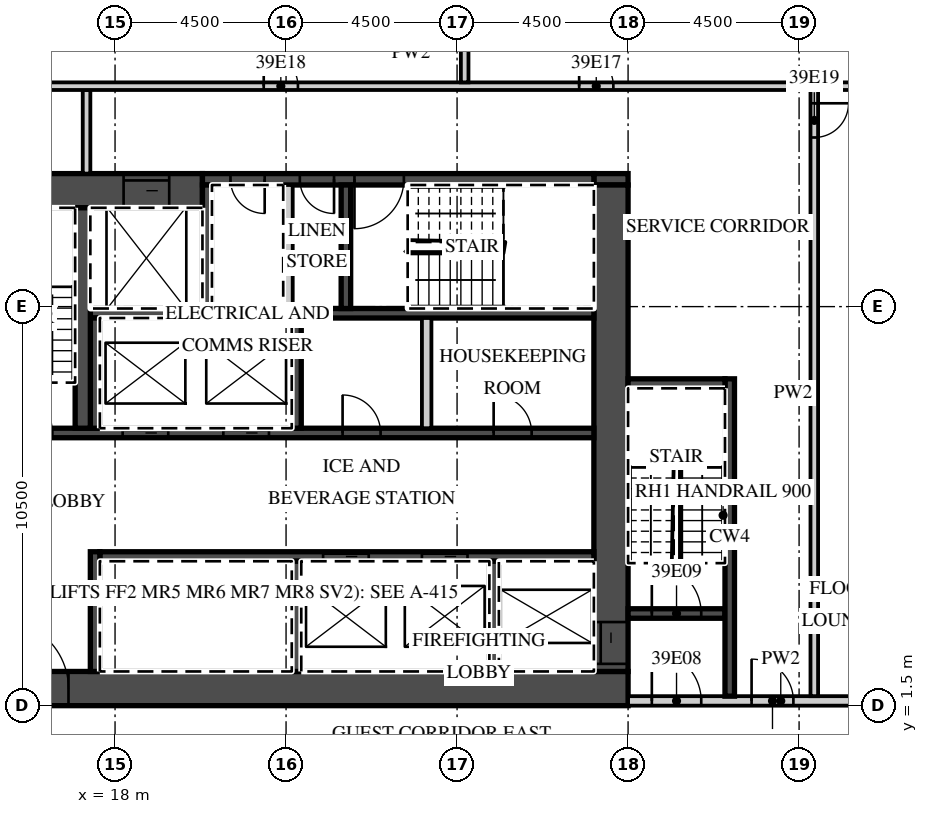
"""IFC4 building model, lengths in metres.
Left out: names, types, materials, properties, quantities, classifications, styles, units other than length and angle.
Written with IfcOpenShell. Run it as: python <this file> out.ifc"""

import sys

from ifc_helpers import new_model, si_unit, direction, frame, frame_2d, origin, place, context, subcontext, project, spatial, rectangle, extrude, element, fill, save


model = new_model("IFC4")
c1 = context("Model", 3, precision=1e-05, world=origin(), true_north=direction((0.0, 1.0)))
c2 = subcontext(c1, "Body", "Model", "MODEL_VIEW")
j1 = project(units=[si_unit("LENGTHUNIT", "METRE"), si_unit("PLANEANGLEUNIT", "RADIAN")], contexts=[c1])
p1 = place(None, origin())
s1 = spatial("IfcSite", under=j1, at=p1, CompositionType="ELEMENT")
p2 = place(p1, origin())
s2 = spatial("IfcBuilding", under=s1, at=p2, CompositionType="ELEMENT")
p3 = place(p2, frame((0.0, 0.0, 170.2)))
s3 = spatial("IfcBuildingStorey", under=s2, at=p3, CompositionType="ELEMENT", Elevation=170.2)
p4 = place(p3, frame((13.5, 1.95, 0.0), z_axis=(0.0, 0.0, 1.0), x_axis=(1.0, 0.0, 0.0)))
e1 = element("IfcWall", 1, at=p4, inside=s3, PredefinedType="SHEAR", context=c2, shape_type="SweptSolid", body=[
    extrude(rectangle(XDim=18.0, YDim=0.9, at=frame_2d((9.0, 0.0))), origin(), (0.0, 0.0, 1.0), 3.02),
])
p5 = place(p4, frame((1.475, 0.0, 0.0)))
e2 = element("IfcOpeningElement", 2, at=p5, cuts=e1, PredefinedType="OPENING", context=c2, shape_type="SweptSolid", body=[
    extrude(rectangle(XDim=1.8, YDim=2.1, at=frame_2d((0.9, 1.05))), frame((0.0, 0.46, 0.0), z_axis=(0.0, -1.0, 0.0), x_axis=(1.0, 0.0, 0.0)), (0.0, 0.0, 1.0), 0.92),
])
p6 = place(p3, frame((13.5, 15.05, 0.0), z_axis=(0.0, 0.0, 1.0), x_axis=(1.0, 0.0, 0.0)))
e3 = element("IfcWall", 3, at=p6, inside=s3, PredefinedType="SHEAR", context=c2, shape_type="SweptSolid", body=[
    extrude(rectangle(XDim=6.8, YDim=0.9, at=frame_2d((3.4, 0.0))), origin(), (0.0, 0.0, 1.0), 3.02),
])
p7 = place(p6, frame((4.725, 0.0, 0.0)))
e4 = element("IfcOpeningElement", 4, at=p7, cuts=e3, PredefinedType="OPENING", context=c2, shape_type="SweptSolid", body=[
    extrude(rectangle(XDim=1.2, YDim=2.1, at=frame_2d((0.6, 1.05))), frame((0.0, 0.46, 0.0), z_axis=(0.0, -1.0, 0.0), x_axis=(1.0, 0.0, 0.0)), (0.0, 0.0, 1.0), 0.92),
])
p8 = place(p3, frame((30.6, 15.35, 0.0), z_axis=(0.0, 0.0, 1.0), x_axis=(1.0, 0.0, 0.0)))
e5 = element("IfcWall", 5, at=p8, inside=s3, PredefinedType="SHEAR", context=c2, shape_type="SweptSolid", body=[
    extrude(rectangle(XDim=0.9, YDim=0.3, at=frame_2d((0.45, 0.0))), origin(), (0.0, 0.0, 1.0), 3.02),
])
p9 = place(p3, frame((20.3, 15.35, 0.0), z_axis=(0.0, 0.0, 1.0), x_axis=(1.0, 0.0, 0.0)))
e6 = element("IfcWall", 6, at=p9, inside=s3, PredefinedType="SHEAR", context=c2, shape_type="SweptSolid", body=[
    extrude(rectangle(XDim=10.3, YDim=0.3, at=frame_2d((5.15, 0.0))), origin(), (0.0, 0.0, 1.0), 3.02),
])
p10 = place(p9, frame((4.0, 0.0, 0.0)))
e7 = element("IfcOpeningElement", 7, at=p10, cuts=e6, PredefinedType="OPENING", context=c2, shape_type="SweptSolid", body=[
    extrude(rectangle(XDim=1.3, YDim=2.1, at=frame_2d((0.65, 1.05))), frame((0.0, 0.16, 0.0), z_axis=(0.0, -1.0, 0.0), x_axis=(1.0, 0.0, 0.0)), (0.0, 0.0, 1.0), 0.32),
])
p11 = place(p9, frame((2.562, 0.0, 0.0)))
e8 = element("IfcOpeningElement", 8, at=p11, cuts=e6, PredefinedType="OPENING", context=c2, shape_type="SweptSolid", body=[
    extrude(rectangle(XDim=0.9, YDim=2.1, at=frame_2d((0.45, 1.05))), frame((0.0, 0.16, 0.0), z_axis=(0.0, -1.0, 0.0), x_axis=(1.0, 0.0, 0.0)), (0.0, 0.0, 1.0), 0.32),
])
p12 = place(p9, frame((0.738, 0.0, 0.0)))
e9 = element("IfcOpeningElement", 9, at=p12, cuts=e6, PredefinedType="OPENING", context=c2, shape_type="SweptSolid", body=[
    extrude(rectangle(XDim=0.9, YDim=2.1, at=frame_2d((0.45, 1.05))), frame((0.0, 0.16, 0.0), z_axis=(0.0, -1.0, 0.0), x_axis=(1.0, 0.0, 0.0)), (0.0, 0.0, 1.0), 0.32),
])
p13 = place(p3, frame((31.05, 2.4, 0.0), z_axis=(0.0, 0.0, 1.0), x_axis=(0.0, 1.0, 0.0)))
e10 = element("IfcWall", 10, at=p13, inside=s3, PredefinedType="SHEAR", context=c2, shape_type="SweptSolid", body=[
    extrude(rectangle(XDim=12.8, YDim=0.9, at=frame_2d((6.4, 0.0))), origin(), (0.0, 0.0, 1.0), 3.02),
])
p14 = place(p13, frame((0.2, 0.0, 0.0)))
e11 = element("IfcOpeningElement", 11, at=p14, cuts=e10, PredefinedType="OPENING", context=c2, shape_type="SweptSolid", body=[
    extrude(rectangle(XDim=1.1, YDim=2.1, at=frame_2d((0.55, 1.05))), frame((0.0, 0.46, 0.0), z_axis=(0.0, -1.0, 0.0), x_axis=(1.0, 0.0, 0.0)), (0.0, 0.0, 1.0), 0.92),
])
p15 = place(p3, frame((17.6, 5.425, 0.0), z_axis=(0.0, 0.0, 1.0), x_axis=(1.0, 0.0, 0.0)))
e12 = element("IfcWall", 12, at=p15, inside=s3, PredefinedType="SHEAR", context=c2, shape_type="SweptSolid", body=[
    extrude(rectangle(XDim=13.0, YDim=0.25, at=frame_2d((6.5, 0.0))), origin(), (0.0, 0.0, 1.0), 3.02),
])
p16 = place(p15, frame((8.475, 0.0, 0.0)))
e13 = element("IfcOpeningElement", 13, at=p16, cuts=e12, PredefinedType="OPENING", context=c2, shape_type="SweptSolid", body=[
    extrude(rectangle(XDim=1.2, YDim=2.1, at=frame_2d((0.6, 1.05))), frame((0.0, 0.135, 0.0), z_axis=(0.0, -1.0, 0.0), x_axis=(1.0, 0.0, 0.0)), (0.0, 0.0, 1.0), 0.27),
])
p17 = place(p15, frame((5.875, 0.0, 0.0)))
e14 = element("IfcOpeningElement", 14, at=p17, cuts=e12, PredefinedType="OPENING", context=c2, shape_type="SweptSolid", body=[
    extrude(rectangle(XDim=1.2, YDim=2.1, at=frame_2d((0.6, 1.05))), frame((0.0, 0.135, 0.0), z_axis=(0.0, -1.0, 0.0), x_axis=(1.0, 0.0, 0.0)), (0.0, 0.0, 1.0), 0.27),
])
p18 = place(p3, frame((17.475, 2.4, 0.0), z_axis=(0.0, 0.0, 1.0), x_axis=(0.0, 1.0, 0.0)))
e15 = element("IfcWall", 15, at=p18, inside=s3, PredefinedType="SHEAR", context=c2, shape_type="SweptSolid", body=[
    extrude(rectangle(XDim=3.15, YDim=0.25, at=frame_2d((1.575, 0.0))), origin(), (0.0, 0.0, 1.0), 3.02),
])
for number, where, z_axis, x_axis in (
    (16, (27.975, 2.4, 0.0), (0.0, 0.0, 1.0), (0.0, 1.0, 0.0)),
    (17, (22.775, 2.4, 0.0), (0.0, 0.0, 1.0), (0.0, 1.0, 0.0)),
):
    element("IfcWall", number, at=place(p3, frame(where, z_axis=z_axis, x_axis=x_axis)), inside=s3, PredefinedType="SHEAR", context=c2, shape_type="SweptSolid", body=[
        extrude(rectangle(XDim=2.9, YDim=0.25, at=frame_2d((1.45, 0.0))), origin(), (0.0, 0.0, 1.0), 3.02),
    ])
p19 = place(p3, frame((14.4, 8.675, 0.0), z_axis=(0.0, 0.0, 1.0), x_axis=(1.0, 0.0, 0.0)))
e18 = element("IfcWall", 18, at=p19, inside=s3, PredefinedType="SHEAR", context=c2, shape_type="SweptSolid", body=[
    extrude(rectangle(XDim=16.2, YDim=0.25, at=frame_2d((8.1, 0.0))), origin(), (0.0, 0.0, 1.0), 3.02),
])
p20 = place(p19, frame((6.45, 0.0, 0.0)))
e19 = element("IfcOpeningElement", 19, at=p20, cuts=e18, PredefinedType="OPENING", context=c2, shape_type="SweptSolid", body=[
    extrude(rectangle(XDim=1.2, YDim=2.1, at=frame_2d((0.6, 1.05))), frame((0.0, 0.135, 0.0), z_axis=(0.0, -1.0, 0.0), x_axis=(1.0, 0.0, 0.0)), (0.0, 0.0, 1.0), 0.27),
])
p21 = place(p19, frame((3.8, 0.0, 0.0)))
e20 = element("IfcOpeningElement", 20, at=p21, cuts=e18, PredefinedType="OPENING", context=c2, shape_type="SweptSolid", body=[
    extrude(rectangle(XDim=1.2, YDim=2.1, at=frame_2d((0.6, 1.05))), frame((0.0, 0.135, 0.0), z_axis=(0.0, -1.0, 0.0), x_axis=(1.0, 0.0, 0.0)), (0.0, 0.0, 1.0), 0.27),
])
p22 = place(p19, frame((0.65, 0.0, 0.0)))
e21 = element("IfcOpeningElement", 21, at=p22, cuts=e18, PredefinedType="OPENING", context=c2, shape_type="SweptSolid", body=[
    extrude(rectangle(XDim=1.3, YDim=2.1, at=frame_2d((0.65, 1.05))), frame((0.0, 0.135, 0.0), z_axis=(0.0, -1.0, 0.0), x_axis=(1.0, 0.0, 0.0)), (0.0, 0.0, 1.0), 0.27),
])
p23 = place(p19, frame((13.562, 0.0, 0.0)))
e22 = element("IfcOpeningElement", 22, at=p23, cuts=e18, PredefinedType="OPENING", context=c2, shape_type="SweptSolid", body=[
    extrude(rectangle(XDim=1.0, YDim=2.1, at=frame_2d((0.5, 1.05))), frame((0.0, 0.135, 0.0), z_axis=(0.0, -1.0, 0.0), x_axis=(1.0, 0.0, 0.0)), (0.0, 0.0, 1.0), 0.27),
])
p24 = place(p19, frame((9.587, 0.0, 0.0)))
e23 = element("IfcOpeningElement", 23, at=p24, cuts=e18, PredefinedType="OPENING", context=c2, shape_type="SweptSolid", body=[
    extrude(rectangle(XDim=1.0, YDim=2.1, at=frame_2d((0.5, 1.05))), frame((0.0, 0.135, 0.0), z_axis=(0.0, -1.0, 0.0), x_axis=(1.0, 0.0, 0.0)), (0.0, 0.0, 1.0), 0.27),
])
p25 = place(p3, frame((17.35, 11.825, 0.0), z_axis=(0.0, 0.0, 1.0), x_axis=(1.0, 0.0, 0.0)))
e24 = element("IfcWall", 24, at=p25, inside=s3, PredefinedType="SHEAR", context=c2, shape_type="SweptSolid", body=[
    extrude(rectangle(XDim=13.25, YDim=0.25, at=frame_2d((6.625, 0.0))), origin(), (0.0, 0.0, 1.0), 3.02),
])
for number, where, z_axis, x_axis in (
    (25, (17.475, 8.8, 0.0), (0.0, 0.0, 1.0), (0.0, 1.0, 0.0)),
    (26, (22.775, 8.8, 0.0), (0.0, 0.0, 1.0), (0.0, 1.0, 0.0)),
):
    element("IfcWall", number, at=place(p3, frame(where, z_axis=z_axis, x_axis=x_axis)), inside=s3, PredefinedType="SHEAR", context=c2, shape_type="SweptSolid", body=[
        extrude(rectangle(XDim=2.9, YDim=0.25, at=frame_2d((1.45, 0.0))), origin(), (0.0, 0.0, 1.0), 3.02),
    ])
p26 = place(p3, frame((26.2, 8.8, 0.0), z_axis=(0.0, 0.0, 1.0), x_axis=(0.0, 1.0, 0.0)))
e27 = element("IfcWall", 27, at=p26, inside=s3, PredefinedType="PARTITIONING", context=c2, shape_type="SweptSolid", body=[
    extrude(rectangle(XDim=2.9, YDim=0.25, at=frame_2d((1.45, 0.0))), origin(), (0.0, 0.0, 1.0), 3.02),
])
p27 = place(p3, frame((17.15, 8.8, 0.0), z_axis=(0.0, 0.0, 1.0), x_axis=(0.0, 1.0, 0.0)))
e28 = element("IfcWall", 28, at=p27, inside=s3, PredefinedType="SHEAR", context=c2, shape_type="SweptSolid", body=[
    extrude(rectangle(XDim=5.8, YDim=0.4, at=frame_2d((2.9, 0.0))), origin(), (0.0, 0.0, 1.0), 3.02),
])
for number, where, z_axis, x_axis in (
    (29, (20.425, 11.95, 0.0), (0.0, 0.0, 1.0), (0.0, 1.0, 0.0)),
    (30, (24.075, 11.95, 0.0), (0.0, 0.0, 1.0), (0.0, 1.0, 0.0)),
):
    element("IfcWall", number, at=place(p3, frame(where, z_axis=z_axis, x_axis=x_axis)), inside=s3, PredefinedType="SHEAR", context=c2, shape_type="SweptSolid", body=[
        extrude(rectangle(XDim=3.25, YDim=0.25, at=frame_2d((1.625, 0.0))), origin(), (0.0, 0.0, 1.0), 3.02),
    ])
p28 = place(p3, frame((22.55, 11.95, 0.0), z_axis=(0.0, 0.0, 1.0), x_axis=(0.0, 1.0, 0.0)))
e31 = element("IfcWall", 31, at=p28, inside=s3, PredefinedType="PARTITIONING", context=c2, shape_type="SweptSolid", body=[
    extrude(rectangle(XDim=3.25, YDim=0.25, at=frame_2d((1.625, 0.0))), origin(), (0.0, 0.0, 1.0), 3.02),
])
p29 = place(p3, frame((31.5, 1.625, 0.0), z_axis=(0.0, 0.0, 1.0), x_axis=(1.0, 0.0, 0.0)))
e32 = element("IfcWall", 32, at=p29, inside=s3, PredefinedType="PARTITIONING", context=c2, shape_type="SweptSolid", body=[
    extrude(rectangle(XDim=8.035, YDim=0.25, at=frame_2d((4.018, 0.0))), origin(), (0.0, 0.0, 1.0), 3.02),
])
p30 = place(p29, frame((0.625, 0.0, 0.0)))
e33 = element("IfcOpeningElement", 33, at=p30, cuts=e32, PredefinedType="OPENING", context=c2, shape_type="SweptSolid", body=[
    extrude(rectangle(XDim=1.3, YDim=2.1, at=frame_2d((0.65, 1.05))), frame((0.0, 0.135, 0.0), z_axis=(0.0, -1.0, 0.0), x_axis=(1.0, 0.0, 0.0)), (0.0, 0.0, 1.0), 0.27),
])
p31 = place(p29, frame((3.25, 0.0, 0.0)))
e34 = element("IfcOpeningElement", 34, at=p31, cuts=e32, PredefinedType="OPENING", context=c2, shape_type="SweptSolid", body=[
    extrude(rectangle(XDim=1.1, YDim=2.1, at=frame_2d((0.55, 1.05))), frame((0.0, 0.135, 0.0), z_axis=(0.0, -1.0, 0.0), x_axis=(1.0, 0.0, 0.0)), (0.0, 0.0, 1.0), 0.27),
])
p32 = place(p3, frame((31.5, 3.925, 0.0), z_axis=(0.0, 0.0, 1.0), x_axis=(1.0, 0.0, 0.0)))
e35 = element("IfcWall", 35, at=p32, inside=s3, PredefinedType="SHEAR", context=c2, shape_type="SweptSolid", body=[
    extrude(rectangle(XDim=2.55, YDim=0.25, at=frame_2d((1.275, 0.0))), origin(), (0.0, 0.0, 1.0), 3.02),
])
p33 = place(p32, frame((0.625, 0.0, 0.0)))
e36 = element("IfcOpeningElement", 36, at=p33, cuts=e35, PredefinedType="OPENING", context=c2, shape_type="SweptSolid", body=[
    extrude(rectangle(XDim=1.3, YDim=2.1, at=frame_2d((0.65, 1.05))), frame((0.0, 0.135, 0.0), z_axis=(0.0, -1.0, 0.0), x_axis=(1.0, 0.0, 0.0)), (0.0, 0.0, 1.0), 0.27),
])
p34 = place(p3, frame((34.175, 1.75, 0.0), z_axis=(0.0, 0.0, 1.0), x_axis=(0.0, 1.0, 0.0)))
e37 = element("IfcWall", 37, at=p34, inside=s3, PredefinedType="SHEAR", context=c2, shape_type="SweptSolid", body=[
    extrude(rectangle(XDim=8.35, YDim=0.25, at=frame_2d((4.175, 0.0))), origin(), (0.0, 0.0, 1.0), 3.02),
])
p35 = place(p3, frame((31.5, 9.975, 0.0), z_axis=(0.0, 0.0, 1.0), x_axis=(1.0, 0.0, 0.0)))
e38 = element("IfcWall", 38, at=p35, inside=s3, PredefinedType="SHEAR", context=c2, shape_type="SweptSolid", body=[
    extrude(rectangle(XDim=2.55, YDim=0.25, at=frame_2d((1.275, 0.0))), origin(), (0.0, 0.0, 1.0), 3.02),
])
p36 = place(p3, frame((17.25, 15.5, 0.0), z_axis=(0.0, 0.0, 1.0), x_axis=(0.0, 1.0, 0.0)))
e39 = element("IfcWall", 39, at=p36, inside=s3, PredefinedType="PARTITIONING", context=c2, shape_type="SweptSolid", body=[
    extrude(rectangle(XDim=2.2, YDim=0.2, at=frame_2d((1.1, 0.0))), origin(), (0.0, 0.0, 1.0), 3.02),
])
p37 = place(p3, frame((36.4, 1.75, 0.0), z_axis=(0.0, 0.0, 1.0), x_axis=(0.0, 1.0, 0.0)))
e40 = element("IfcWall", 40, at=p37, inside=s3, PredefinedType="PARTITIONING", context=c2, shape_type="SweptSolid", body=[
    extrude(rectangle(XDim=15.95, YDim=0.2, at=frame_2d((7.975, 0.0))), origin(), (0.0, 0.0, 1.0), 3.02),
])
p38 = place(p37, frame((14.7, 0.0, 0.0)))
e41 = element("IfcOpeningElement", 41, at=p38, cuts=e40, PredefinedType="OPENING", context=c2, shape_type="SweptSolid", body=[
    extrude(rectangle(XDim=0.9, YDim=2.1, at=frame_2d((0.45, 1.05))), frame((0.0, 0.11, 0.0), z_axis=(0.0, -1.0, 0.0), x_axis=(1.0, 0.0, 0.0)), (0.0, 0.0, 1.0), 0.22),
])
p39 = place(p3, frame((13.6, 17.8, 0.0), z_axis=(0.0, 0.0, 1.0), x_axis=(1.0, 0.0, 0.0)))
e42 = element("IfcWall", 42, at=p39, inside=s3, PredefinedType="PARTITIONING", context=c2, shape_type="SweptSolid", body=[
    extrude(rectangle(XDim=24.378, YDim=0.2, at=frame_2d((12.189, 0.0))), origin(), (0.0, 0.0, 1.0), 3.02),
])
p40 = place(p39, frame((16.613, 0.0, 0.0)))
e43 = element("IfcOpeningElement", 43, at=p40, cuts=e42, PredefinedType="OPENING", context=c2, shape_type="SweptSolid", body=[
    extrude(rectangle(XDim=0.9, YDim=2.1, at=frame_2d((0.45, 1.05))), frame((0.0, 0.11, 0.0), z_axis=(0.0, -1.0, 0.0), x_axis=(1.0, 0.0, 0.0)), (0.0, 0.0, 1.0), 0.22),
])
p41 = place(p39, frame((8.312, 0.0, 0.0)))
e44 = element("IfcOpeningElement", 44, at=p41, cuts=e42, PredefinedType="OPENING", context=c2, shape_type="SweptSolid", body=[
    extrude(rectangle(XDim=0.9, YDim=2.1, at=frame_2d((0.45, 1.05))), frame((0.0, 0.11, 0.0), z_axis=(0.0, -1.0, 0.0), x_axis=(1.0, 0.0, 0.0)), (0.0, 0.0, 1.0), 0.22),
])
p42 = place(p3, frame((27.2, 17.9, 0.0), z_axis=(0.0, 0.0, 1.0), x_axis=(0.0, 1.0, 0.0)))
e45 = element("IfcWall", 45, at=p42, inside=s3, PredefinedType="PARTITIONING", context=c2, shape_type="SweptSolid", body=[
    extrude(rectangle(XDim=5.01, YDim=0.2, at=frame_2d((2.505, 0.0))), origin(), (0.0, 0.0, 1.0), 3.02),
])
p43 = place(p20, origin())
e46 = element("IfcDoor", 46, at=p43, inside=s3, OperationType="SLIDING_TO_LEFT", PredefinedType="DOOR", context=c2, shape_type="SweptSolid", body=[
    extrude(rectangle(XDim=1.2, YDim=2.1, at=frame_2d((0.6, 1.05))), frame((0.0, 0.025, 0.0), z_axis=(0.0, -1.0, 0.0), x_axis=(1.0, 0.0, 0.0)), (0.0, 0.0, 1.0), 0.05),
])
fill(e19, e46)
p44 = place(p21, origin())
e47 = element("IfcDoor", 47, at=p44, inside=s3, OperationType="SLIDING_TO_RIGHT", PredefinedType="DOOR", context=c2, shape_type="SweptSolid", body=[
    extrude(rectangle(XDim=1.2, YDim=2.1, at=frame_2d((0.6, 1.05))), frame((0.0, 0.025, 0.0), z_axis=(0.0, -1.0, 0.0), x_axis=(1.0, 0.0, 0.0)), (0.0, 0.0, 1.0), 0.05),
])
fill(e20, e47)
p45 = place(p16, origin())
e48 = element("IfcDoor", 48, at=p45, inside=s3, OperationType="SLIDING_TO_LEFT", PredefinedType="DOOR", context=c2, shape_type="SweptSolid", body=[
    extrude(rectangle(XDim=1.2, YDim=2.1, at=frame_2d((0.6, 1.05))), frame((0.0, 0.025, 0.0), z_axis=(0.0, -1.0, 0.0), x_axis=(1.0, 0.0, 0.0)), (0.0, 0.0, 1.0), 0.05),
])
fill(e13, e48)
p46 = place(p17, origin())
e49 = element("IfcDoor", 49, at=p46, inside=s3, OperationType="SLIDING_TO_RIGHT", PredefinedType="DOOR", context=c2, shape_type="SweptSolid", body=[
    extrude(rectangle(XDim=1.2, YDim=2.1, at=frame_2d((0.6, 1.05))), frame((0.0, 0.025, 0.0), z_axis=(0.0, -1.0, 0.0), x_axis=(1.0, 0.0, 0.0)), (0.0, 0.0, 1.0), 0.05),
])
fill(e14, e49)
p47 = place(p7, origin())
e50 = element("IfcDoor", 50, at=p47, inside=s3, OperationType="SLIDING_TO_LEFT", PredefinedType="DOOR", context=c2, shape_type="SweptSolid", body=[
    extrude(rectangle(XDim=1.2, YDim=2.1, at=frame_2d((0.6, 1.05))), frame((0.0, 0.025, 0.0), z_axis=(0.0, -1.0, 0.0), x_axis=(1.0, 0.0, 0.0)), (0.0, 0.0, 1.0), 0.05),
])
fill(e4, e50)
p48 = place(p14, origin())
e51 = element("IfcDoor", 51, at=p48, inside=s3, OperationType="SLIDING_TO_LEFT", PredefinedType="DOOR", context=c2, shape_type="SweptSolid", body=[
    extrude(rectangle(XDim=1.1, YDim=2.1, at=frame_2d((0.55, 1.05))), frame((0.0, 0.025, 0.0), z_axis=(0.0, -1.0, 0.0), x_axis=(1.0, 0.0, 0.0)), (0.0, 0.0, 1.0), 0.05),
])
fill(e11, e51)
p49 = place(p5, origin())
e52 = element("IfcDoor", 52, at=p49, inside=s3, OperationType="DOUBLE_DOOR_DOUBLE_SWING", PredefinedType="DOOR", context=c2, shape_type="SweptSolid", body=[
    extrude(rectangle(XDim=1.8, YDim=2.1, at=frame_2d((0.9, 1.05))), frame((0.0, 0.025, 0.0), z_axis=(0.0, -1.0, 0.0), x_axis=(1.0, 0.0, 0.0)), (0.0, 0.0, 1.0), 0.05),
])
fill(e2, e52)
p50 = place(p30, origin())
e53 = element("IfcDoor", 53, at=p50, inside=s3, OperationType="SINGLE_SWING_LEFT", PredefinedType="DOOR", context=c2, shape_type="SweptSolid", body=[
    extrude(rectangle(XDim=1.3, YDim=2.1, at=frame_2d((0.65, 1.05))), frame((0.0, 0.025, 0.0), z_axis=(0.0, -1.0, 0.0), x_axis=(1.0, 0.0, 0.0)), (0.0, 0.0, 1.0), 0.05),
])
fill(e33, e53)
p51 = place(p33, origin())
e54 = element("IfcDoor", 54, at=p51, inside=s3, OperationType="SINGLE_SWING_LEFT", PredefinedType="DOOR", context=c2, shape_type="SweptSolid", body=[
    extrude(rectangle(XDim=1.3, YDim=2.1, at=frame_2d((0.65, 1.05))), frame((0.0, 0.025, 0.0), z_axis=(0.0, -1.0, 0.0), x_axis=(1.0, 0.0, 0.0)), (0.0, 0.0, 1.0), 0.05),
])
fill(e36, e54)
p52 = place(p31, origin())
e55 = element("IfcDoor", 55, at=p52, inside=s3, OperationType="SINGLE_SWING_LEFT", PredefinedType="DOOR", context=c2, shape_type="SweptSolid", body=[
    extrude(rectangle(XDim=1.1, YDim=2.1, at=frame_2d((0.55, 1.05))), frame((0.0, 0.025, 0.0), z_axis=(0.0, -1.0, 0.0), x_axis=(1.0, 0.0, 0.0)), (0.0, 0.0, 1.0), 0.05),
])
fill(e34, e55)
p53 = place(p10, origin())
e56 = element("IfcDoor", 56, at=p53, inside=s3, OperationType="SINGLE_SWING_LEFT", PredefinedType="DOOR", context=c2, shape_type="SweptSolid", body=[
    extrude(rectangle(XDim=1.3, YDim=2.1, at=frame_2d((0.65, 1.05))), frame((0.0, 0.025, 0.0), z_axis=(0.0, -1.0, 0.0), x_axis=(1.0, 0.0, 0.0)), (0.0, 0.0, 1.0), 0.05),
])
fill(e7, e56)
p54 = place(p11, origin())
e57 = element("IfcDoor", 57, at=p54, inside=s3, OperationType="SINGLE_SWING_RIGHT", PredefinedType="DOOR", context=c2, shape_type="SweptSolid", body=[
    extrude(rectangle(XDim=0.9, YDim=2.1, at=frame_2d((0.45, 1.05))), frame((0.0, 0.025, 0.0), z_axis=(0.0, -1.0, 0.0), x_axis=(1.0, 0.0, 0.0)), (0.0, 0.0, 1.0), 0.05),
])
fill(e8, e57)
p55 = place(p12, origin())
e58 = element("IfcDoor", 58, at=p55, inside=s3, OperationType="SINGLE_SWING_RIGHT", PredefinedType="DOOR", context=c2, shape_type="SweptSolid", body=[
    extrude(rectangle(XDim=0.9, YDim=2.1, at=frame_2d((0.45, 1.05))), frame((0.0, 0.025, 0.0), z_axis=(0.0, -1.0, 0.0), x_axis=(1.0, 0.0, 0.0)), (0.0, 0.0, 1.0), 0.05),
])
fill(e9, e58)
p56 = place(p23, origin())
e59 = element("IfcDoor", 59, at=p56, inside=s3, OperationType="SINGLE_SWING_LEFT", PredefinedType="DOOR", context=c2, shape_type="SweptSolid", body=[
    extrude(rectangle(XDim=1.0, YDim=2.1, at=frame_2d((0.5, 1.05))), frame((0.0, 0.025, 0.0), z_axis=(0.0, -1.0, 0.0), x_axis=(1.0, 0.0, 0.0)), (0.0, 0.0, 1.0), 0.05),
])
fill(e22, e59)
p57 = place(p24, origin())
e60 = element("IfcDoor", 60, at=p57, inside=s3, OperationType="SINGLE_SWING_LEFT", PredefinedType="DOOR", context=c2, shape_type="SweptSolid", body=[
    extrude(rectangle(XDim=1.0, YDim=2.1, at=frame_2d((0.5, 1.05))), frame((0.0, 0.025, 0.0), z_axis=(0.0, -1.0, 0.0), x_axis=(1.0, 0.0, 0.0)), (0.0, 0.0, 1.0), 0.05),
])
fill(e23, e60)
p58 = place(p40, origin())
e61 = element("IfcDoor", 61, at=p58, inside=s3, OperationType="SINGLE_SWING_LEFT", PredefinedType="DOOR", context=c2, shape_type="SweptSolid", body=[
    extrude(rectangle(XDim=0.9, YDim=2.1, at=frame_2d((0.45, 1.05))), frame((0.0, 0.025, 0.0), z_axis=(0.0, -1.0, 0.0), x_axis=(1.0, 0.0, 0.0)), (0.0, 0.0, 1.0), 0.05),
])
fill(e43, e61)
p59 = place(p41, origin())
e62 = element("IfcDoor", 62, at=p59, inside=s3, OperationType="SINGLE_SWING_LEFT", PredefinedType="DOOR", context=c2, shape_type="SweptSolid", body=[
    extrude(rectangle(XDim=0.9, YDim=2.1, at=frame_2d((0.45, 1.05))), frame((0.0, 0.025, 0.0), z_axis=(0.0, -1.0, 0.0), x_axis=(1.0, 0.0, 0.0)), (0.0, 0.0, 1.0), 0.05),
])
fill(e44, e62)
p60 = place(p38, origin())
e63 = element("IfcDoor", 63, at=p60, inside=s3, OperationType="SINGLE_SWING_RIGHT", PredefinedType="DOOR", context=c2, shape_type="SweptSolid", body=[
    extrude(rectangle(XDim=0.9, YDim=2.1, at=frame_2d((0.45, 1.05))), frame((0.0, 0.025, 0.0), z_axis=(0.0, -1.0, 0.0), x_axis=(1.0, 0.0, 0.0)), (0.0, 0.0, 1.0), 0.05),
])
fill(e41, e63)
save(model, sys.argv[1])
